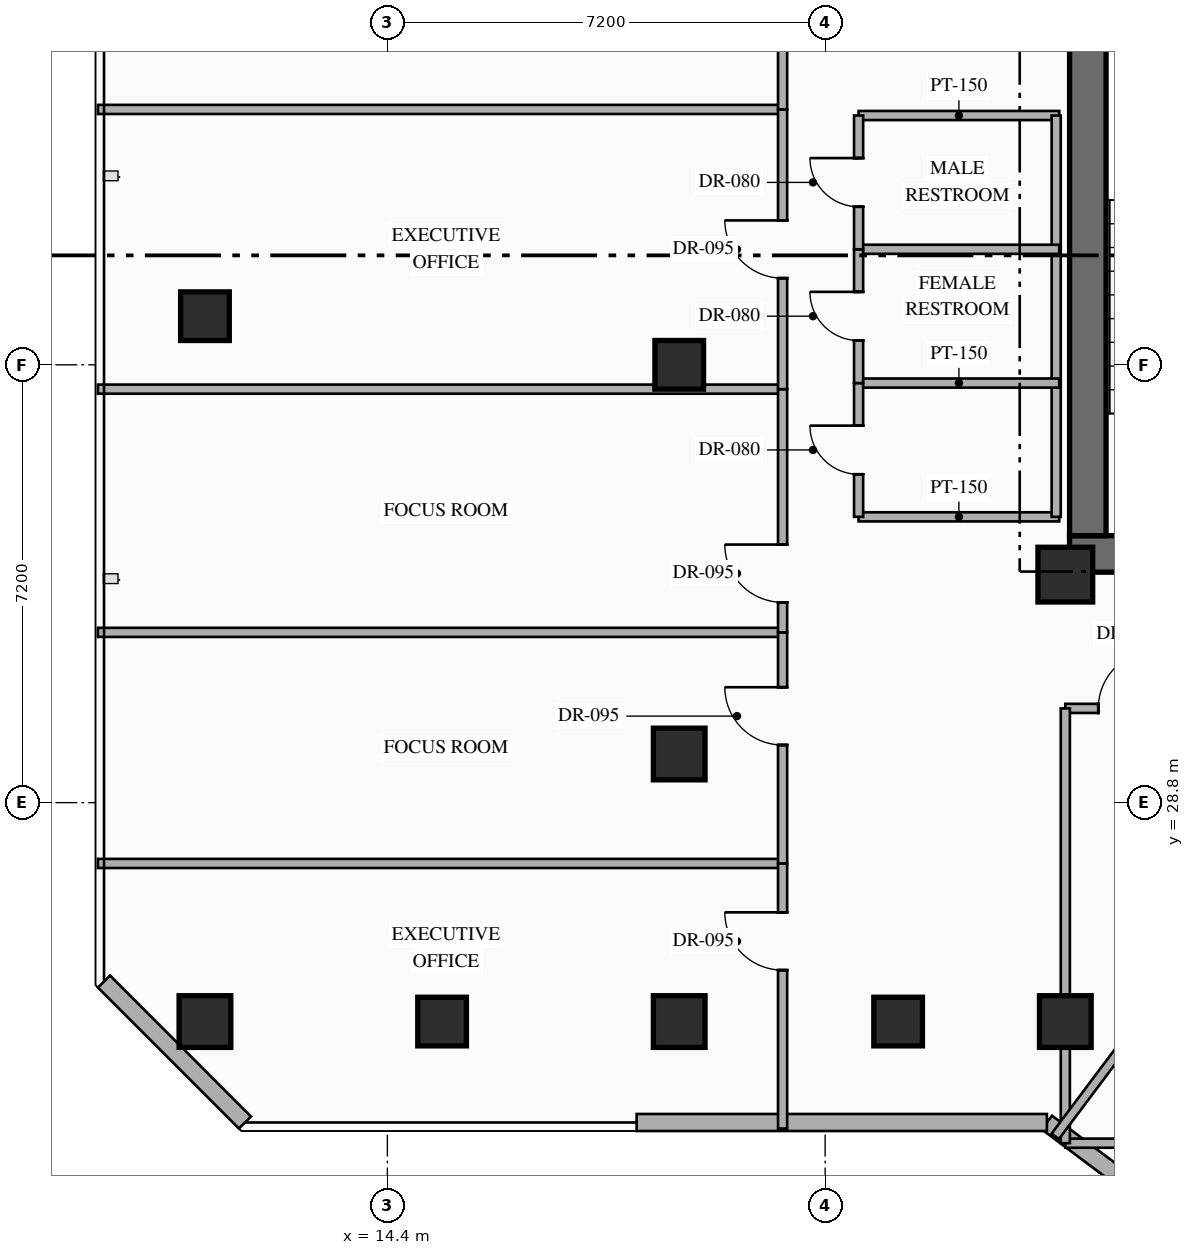
"""IFC4 building model, lengths in metres.
Left out: names, types, materials, properties, quantities, classifications, styles, units other than length and angle.
Written with IfcOpenShell. Run it as: python <this file> out.ifc"""

import sys

from ifc_helpers import new_model, si_unit, direction, frame, frame_2d, origin, origin_2d, place, context, subcontext, project, spatial, rectangle, hollow_rectangle, extrude, element, fill, save


model = new_model("IFC4")
c1 = context("Model", 3, precision=1e-05, world=origin(), true_north=direction((0.0, 1.0)))
c2 = subcontext(c1, "Body", "Model", "MODEL_VIEW")
j1 = project(units=[si_unit("LENGTHUNIT", "METRE"), si_unit("PLANEANGLEUNIT", "RADIAN")], contexts=[c1])
p1 = place(None, origin())
s1 = spatial("IfcSite", under=j1, at=p1, CompositionType="ELEMENT")
p2 = place(p1, origin())
s2 = spatial("IfcBuilding", under=s1, at=p2, CompositionType="ELEMENT")
p3 = place(p2, frame((0.0, 0.0, 149.25)))
s3 = spatial("IfcBuildingStorey", under=s2, at=p3, CompositionType="ELEMENT", Elevation=149.25)
p4 = place(p3, frame((25.62, 32.89, 0.0), z_axis=(0.0, 0.0, 1.0), x_axis=(1.0, 0.0, 0.0)))
e1 = element("IfcWall", 1, at=p4, inside=s3, PredefinedType="SHEAR", context=c2, shape_type="SweptSolid", body=[
    extrude(rectangle(XDim=7.78, YDim=0.6, at=frame_2d((3.89, 0.0))), origin(), (0.0, 0.0, 1.0), 3.6),
])
p5 = place(p4, frame((2.83, 0.0, 0.0)))
e2 = element("IfcOpeningElement", 2, at=p5, cuts=e1, PredefinedType="OPENING", context=c2, shape_type="SweptSolid", body=[
    extrude(rectangle(XDim=1.1, YDim=2.2, at=frame_2d((0.55, 1.1))), frame((0.0, 0.31, 0.0), z_axis=(0.0, -1.0, 0.0), x_axis=(1.0, 0.0, 0.0)), (0.0, 0.0, 1.0), 0.62),
])
p6 = place(p4, frame((5.58, 0.0, 0.0)))
e3 = element("IfcOpeningElement", 3, at=p6, cuts=e1, PredefinedType="OPENING", context=c2, shape_type="SweptSolid", body=[
    extrude(rectangle(XDim=1.1, YDim=2.15, at=frame_2d((0.55, 1.075))), frame((0.0, 0.31, 0.0), z_axis=(0.0, -1.0, 0.0), x_axis=(1.0, 0.0, 0.0)), (0.0, 0.0, 1.0), 0.62),
])
p7 = place(p3, frame((25.92, 33.19, 0.0), z_axis=(0.0, 0.0, 1.0), x_axis=(0.0, 1.0, 0.0)))
e4 = element("IfcWall", 4, at=p7, inside=s3, PredefinedType="SHEAR", context=c2, shape_type="SweptSolid", body=[
    extrude(rectangle(XDim=9.48, YDim=0.6, at=frame_2d((4.74, 0.0))), origin(), (0.0, 0.0, 1.0), 3.6),
])
p8 = place(p3, frame((25.55, 32.55, 0.0), z_axis=(0.0, 0.0, 1.0), x_axis=(1.0, 0.0, 0.0)))
e5 = element("IfcColumn", 5, at=p8, inside=s3, PredefinedType="COLUMN", context=c2, shape_type="SweptSolid", body=[
    extrude(rectangle(XDim=0.9, YDim=0.9, at=origin_2d()), origin(), (0.0, 0.0, 1.0), 3.6),
])
for number, where, z_axis, x_axis in (
    (6, (25.55, 25.2, 0.0), (0.0, 0.0, 1.0), (1.0, 0.0, 0.0)),
    (7, (11.4, 25.2, 0.0), (0.0, 0.0, 1.0), (1.0, 0.0, 0.0)),
    (8, (19.2, 25.2, 0.0), (0.0, 0.0, 1.0), (1.0, 0.0, 0.0)),
    (9, (19.2, 29.6, 0.0), (0.0, 0.0, 1.0), (1.0, 0.0, 0.0)),
):
    element("IfcColumn", number, at=place(p3, frame(where, z_axis=z_axis, x_axis=x_axis)), inside=s3, PredefinedType="COLUMN", context=c2, shape_type="SweptSolid", body=[
        extrude(hollow_rectangle(XDim=0.85, YDim=0.85, WallThickness=0.032, at=origin_2d()), origin(), (0.0, 0.0, 1.0), 3.6),
    ])
for number, where, z_axis, x_axis in (
    (10, (22.8, 25.2, 0.0), (0.0, 0.0, 1.0), (1.0, 0.0, 0.0)),
    (11, (11.4, 36.8, 0.0), (0.0, 0.0, 1.0), (1.0, 0.0, 0.0)),
    (12, (19.2, 36.0, 0.0), (0.0, 0.0, 1.0), (1.0, 0.0, 0.0)),
    (13, (15.3, 25.2, 0.0), (0.0, 0.0, 1.0), (1.0, 0.0, 0.0)),
):
    element("IfcColumn", number, at=place(p3, frame(where, z_axis=z_axis, x_axis=x_axis)), inside=s3, PredefinedType="COLUMN", context=c2, shape_type="SweptSolid", body=[
        extrude(hollow_rectangle(XDim=0.8, YDim=0.8, WallThickness=0.032, at=origin_2d()), origin(), (0.0, 0.0, 1.0), 3.6),
    ])
p9 = place(p3, frame((44.918, 8.787, 0.0), z_axis=(0.0, 0.0, 1.0), x_axis=(-0.800004765927, 0.599993645378, 0.0)))
e14 = element("IfcWall", 14, at=p9, inside=s3, PredefinedType="STANDARD", context=c2, shape_type="SweptSolid", body=[
    extrude(rectangle(XDim=24.588, YDim=0.28, at=frame_2d((12.294, 0.0))), origin(), (0.0, 0.0, 1.0), 3.35),
])
p10 = place(p3, frame((25.247, 23.54, 0.0), z_axis=(0.0, 0.0, 1.0), x_axis=(-1.0, 0.0, 0.0)))
e15 = element("IfcWall", 15, at=p10, inside=s3, PredefinedType="STANDARD", context=c2, shape_type="SweptSolid", body=[
    extrude(rectangle(XDim=6.747, YDim=0.28, at=frame_2d((3.374, 0.0))), origin(), (0.0, 0.0, 1.0), 3.35),
])
p11 = place(p3, frame((12.058, 23.54, 0.0), z_axis=(0.0, 0.0, 1.0), x_axis=(-0.707144017911, 0.707069542501, 0.0)))
e16 = element("IfcWall", 16, at=p11, inside=s3, PredefinedType="STANDARD", context=c2, shape_type="SweptSolid", body=[
    extrude(rectangle(XDim=3.278, YDim=0.28, at=frame_2d((1.639, 0.0))), origin(), (0.0, 0.0, 1.0), 3.35),
])
for number, where, z_axis, x_axis in (
    (17, (22.15, 33.5, 0.0), (0.0, 0.0, 1.0), (1.0, 0.0, 0.0)),
    (18, (22.15, 40.1, 0.0), (0.0, 0.0, 1.0), (1.0, 0.0, 0.0)),
):
    element("IfcWall", number, at=place(p3, frame(where, z_axis=z_axis, x_axis=x_axis)), inside=s3, PredefinedType="PARTITIONING", context=c2, shape_type="SweptSolid", body=[
        extrude(rectangle(XDim=3.3, YDim=0.15, at=frame_2d((1.65, 0.0))), origin(), (0.0, 0.0, 1.0), 3.35),
    ])
p12 = place(p3, frame((25.4, 33.5, 0.0), z_axis=(0.0, 0.0, 1.0), x_axis=(0.0, 1.0, 0.0)))
e19 = element("IfcWall", 19, at=p12, inside=s3, PredefinedType="PARTITIONING", context=c2, shape_type="SweptSolid", body=[
    extrude(rectangle(XDim=6.6, YDim=0.15, at=frame_2d((3.3, 0.0))), origin(), (0.0, 0.0, 1.0), 3.35),
])
for number, where, z_axis, x_axis in (
    (20, (22.15, 35.7, 0.0), (0.0, 0.0, 1.0), (1.0, 0.0, 0.0)),
    (21, (22.15, 37.9, 0.0), (0.0, 0.0, 1.0), (1.0, 0.0, 0.0)),
):
    element("IfcWall", number, at=place(p3, frame(where, z_axis=z_axis, x_axis=x_axis)), inside=s3, PredefinedType="PARTITIONING", context=c2, shape_type="SweptSolid", body=[
        extrude(rectangle(XDim=3.3, YDim=0.15, at=frame_2d((1.65, 0.0))), origin(), (0.0, 0.0, 1.0), 3.35),
    ])
p13 = place(p3, frame((22.15, 33.5, 0.0), z_axis=(0.0, 0.0, 1.0), x_axis=(0.0, 1.0, 0.0)))
e22 = element("IfcWall", 22, at=p13, inside=s3, PredefinedType="PARTITIONING", context=c2, shape_type="SweptSolid", body=[
    extrude(rectangle(XDim=2.2, YDim=0.15, at=frame_2d((1.1, 0.0))), origin(), (0.0, 0.0, 1.0), 3.35),
])
p14 = place(p13, frame((0.7, 0.0, 0.0)))
e23 = element("IfcOpeningElement", 23, at=p14, cuts=e22, PredefinedType="OPENING", context=c2, shape_type="SweptSolid", body=[
    extrude(rectangle(XDim=0.8, YDim=2.06, at=frame_2d((0.4, 1.03))), frame((0.0, 0.085, 0.0), z_axis=(0.0, -1.0, 0.0), x_axis=(1.0, 0.0, 0.0)), (0.0, 0.0, 1.0), 0.17),
])
p15 = place(p3, frame((22.15, 35.7, 0.0), z_axis=(0.0, 0.0, 1.0), x_axis=(0.0, 1.0, 0.0)))
e24 = element("IfcWall", 24, at=p15, inside=s3, PredefinedType="PARTITIONING", context=c2, shape_type="SweptSolid", body=[
    extrude(rectangle(XDim=2.2, YDim=0.15, at=frame_2d((1.1, 0.0))), origin(), (0.0, 0.0, 1.0), 3.35),
])
p16 = place(p15, frame((0.7, 0.0, 0.0)))
e25 = element("IfcOpeningElement", 25, at=p16, cuts=e24, PredefinedType="OPENING", context=c2, shape_type="SweptSolid", body=[
    extrude(rectangle(XDim=0.8, YDim=2.06, at=frame_2d((0.4, 1.03))), frame((0.0, 0.085, 0.0), z_axis=(0.0, -1.0, 0.0), x_axis=(1.0, 0.0, 0.0)), (0.0, 0.0, 1.0), 0.17),
])
p17 = place(p3, frame((22.15, 37.9, 0.0), z_axis=(0.0, 0.0, 1.0), x_axis=(0.0, 1.0, 0.0)))
e26 = element("IfcWall", 26, at=p17, inside=s3, PredefinedType="PARTITIONING", context=c2, shape_type="SweptSolid", body=[
    extrude(rectangle(XDim=2.2, YDim=0.15, at=frame_2d((1.1, 0.0))), origin(), (0.0, 0.0, 1.0), 3.35),
])
p18 = place(p17, frame((0.7, 0.0, 0.0)))
e27 = element("IfcOpeningElement", 27, at=p18, cuts=e26, PredefinedType="OPENING", context=c2, shape_type="SweptSolid", body=[
    extrude(rectangle(XDim=0.8, YDim=2.06, at=frame_2d((0.4, 1.03))), frame((0.0, 0.085, 0.0), z_axis=(0.0, -1.0, 0.0), x_axis=(1.0, 0.0, 0.0)), (0.0, 0.0, 1.0), 0.17),
])
p19 = place(p3, frame((25.55, 23.2, 0.0), z_axis=(0.0, 0.0, 1.0), x_axis=(1.0, 0.0, 0.0)))
e28 = element("IfcWall", 28, at=p19, inside=s3, PredefinedType="PARTITIONING", context=c2, shape_type="SweptSolid", body=[
    extrude(rectangle(XDim=4.95, YDim=0.15, at=frame_2d((2.475, 0.0))), origin(), (0.0, 0.0, 1.0), 3.35),
])
p20 = place(p3, frame((25.55, 30.35, 0.0), z_axis=(0.0, 0.0, 1.0), x_axis=(1.0, 0.0, 0.0)))
e29 = element("IfcWall", 29, at=p20, inside=s3, PredefinedType="PARTITIONING", context=c2, shape_type="SweptSolid", body=[
    extrude(rectangle(XDim=4.95, YDim=0.15, at=frame_2d((2.475, 0.0))), origin(), (0.0, 0.0, 1.0), 3.35),
])
p21 = place(p20, frame((0.542, 0.0, 0.0)))
e30 = element("IfcOpeningElement", 30, at=p21, cuts=e29, PredefinedType="OPENING", context=c2, shape_type="SweptSolid", body=[
    extrude(rectangle(XDim=0.95, YDim=2.15, at=frame_2d((0.475, 1.075))), frame((0.0, 0.085, 0.0), z_axis=(0.0, -1.0, 0.0), x_axis=(1.0, 0.0, 0.0)), (0.0, 0.0, 1.0), 0.17),
])
p22 = place(p3, frame((25.55, 23.2, 0.0), z_axis=(0.0, 0.0, 1.0), x_axis=(0.0, 1.0, 0.0)))
e31 = element("IfcWall", 31, at=p22, inside=s3, PredefinedType="PARTITIONING", context=c2, shape_type="SweptSolid", body=[
    extrude(rectangle(XDim=7.15, YDim=0.15, at=frame_2d((3.575, 0.0))), origin(), (0.0, 0.0, 1.0), 2.695),
])
p23 = place(p3, frame((9.64, 27.8, 0.0), z_axis=(0.0, 0.0, 1.0), x_axis=(1.0, 0.0, 0.0)))
e32 = element("IfcWall", 32, at=p23, inside=s3, PredefinedType="PARTITIONING", context=c2, shape_type="SweptSolid", body=[
    extrude(rectangle(XDim=11.26, YDim=0.15, at=frame_2d((5.63, 0.0))), origin(), (0.0, 0.0, 1.0), 3.35),
])
p24 = place(p3, frame((20.9, 23.44, 0.0), z_axis=(0.0, 0.0, 1.0), x_axis=(0.0, 1.0, 0.0)))
e33 = element("IfcWall", 33, at=p24, inside=s3, PredefinedType="PARTITIONING", context=c2, shape_type="SweptSolid", body=[
    extrude(rectangle(XDim=4.36, YDim=0.15, at=frame_2d((2.18, 0.0))), origin(), (0.0, 0.0, 1.0), 3.35),
])
p25 = place(p24, frame((2.606, 0.0, 0.0)))
e34 = element("IfcOpeningElement", 34, at=p25, cuts=e33, PredefinedType="OPENING", context=c2, shape_type="SweptSolid", body=[
    extrude(rectangle(XDim=0.95, YDim=2.15, at=frame_2d((0.475, 1.075))), frame((0.0, 0.085, 0.0), z_axis=(0.0, -1.0, 0.0), x_axis=(1.0, 0.0, 0.0)), (0.0, 0.0, 1.0), 0.17),
])
p26 = place(p3, frame((9.64, 31.6, 0.0), z_axis=(0.0, 0.0, 1.0), x_axis=(1.0, 0.0, 0.0)))
e35 = element("IfcWall", 35, at=p26, inside=s3, PredefinedType="PARTITIONING", context=c2, shape_type="SweptSolid", body=[
    extrude(rectangle(XDim=11.26, YDim=0.15, at=frame_2d((5.63, 0.0))), origin(), (0.0, 0.0, 1.0), 3.35),
])
p27 = place(p3, frame((20.9, 27.8, 0.0), z_axis=(0.0, 0.0, 1.0), x_axis=(0.0, 1.0, 0.0)))
e36 = element("IfcWall", 36, at=p27, inside=s3, PredefinedType="PARTITIONING", context=c2, shape_type="SweptSolid", body=[
    extrude(rectangle(XDim=3.8, YDim=0.15, at=frame_2d((1.9, 0.0))), origin(), (0.0, 0.0, 1.0), 3.35),
])
p28 = place(p27, frame((1.948, 0.0, 0.0)))
e37 = element("IfcOpeningElement", 37, at=p28, cuts=e36, PredefinedType="OPENING", context=c2, shape_type="SweptSolid", body=[
    extrude(rectangle(XDim=0.95, YDim=2.15, at=frame_2d((0.475, 1.075))), frame((0.0, 0.085, 0.0), z_axis=(0.0, -1.0, 0.0), x_axis=(1.0, 0.0, 0.0)), (0.0, 0.0, 1.0), 0.17),
])
p29 = place(p3, frame((9.64, 35.6, 0.0), z_axis=(0.0, 0.0, 1.0), x_axis=(1.0, 0.0, 0.0)))
e38 = element("IfcWall", 38, at=p29, inside=s3, PredefinedType="PARTITIONING", context=c2, shape_type="SweptSolid", body=[
    extrude(rectangle(XDim=11.26, YDim=0.15, at=frame_2d((5.63, 0.0))), origin(), (0.0, 0.0, 1.0), 3.35),
])
p30 = place(p3, frame((20.9, 31.6, 0.0), z_axis=(0.0, 0.0, 1.0), x_axis=(0.0, 1.0, 0.0)))
e39 = element("IfcWall", 39, at=p30, inside=s3, PredefinedType="PARTITIONING", context=c2, shape_type="SweptSolid", body=[
    extrude(rectangle(XDim=4.0, YDim=0.15, at=frame_2d((2.0, 0.0))), origin(), (0.0, 0.0, 1.0), 3.35),
])
p31 = place(p30, frame((0.494, 0.0, 0.0)))
e40 = element("IfcOpeningElement", 40, at=p31, cuts=e39, PredefinedType="OPENING", context=c2, shape_type="SweptSolid", body=[
    extrude(rectangle(XDim=0.95, YDim=2.15, at=frame_2d((0.475, 1.075))), frame((0.0, 0.085, 0.0), z_axis=(0.0, -1.0, 0.0), x_axis=(1.0, 0.0, 0.0)), (0.0, 0.0, 1.0), 0.17),
])
p32 = place(p3, frame((9.64, 40.2, 0.0), z_axis=(0.0, 0.0, 1.0), x_axis=(1.0, 0.0, 0.0)))
e41 = element("IfcWall", 41, at=p32, inside=s3, PredefinedType="PARTITIONING", context=c2, shape_type="SweptSolid", body=[
    extrude(rectangle(XDim=11.26, YDim=0.15, at=frame_2d((5.63, 0.0))), origin(), (0.0, 0.0, 1.0), 3.35),
])
p33 = place(p3, frame((20.9, 35.6, 0.0), z_axis=(0.0, 0.0, 1.0), x_axis=(0.0, 1.0, 0.0)))
e42 = element("IfcWall", 42, at=p33, inside=s3, PredefinedType="PARTITIONING", context=c2, shape_type="SweptSolid", body=[
    extrude(rectangle(XDim=4.6, YDim=0.15, at=frame_2d((2.3, 0.0))), origin(), (0.0, 0.0, 1.0), 3.35),
])
p34 = place(p33, frame((1.825, 0.0, 0.0)))
e43 = element("IfcOpeningElement", 43, at=p34, cuts=e42, PredefinedType="OPENING", context=c2, shape_type="SweptSolid", body=[
    extrude(rectangle(XDim=0.95, YDim=2.15, at=frame_2d((0.475, 1.075))), frame((0.0, 0.085, 0.0), z_axis=(0.0, -1.0, 0.0), x_axis=(1.0, 0.0, 0.0)), (0.0, 0.0, 1.0), 0.17),
])
p35 = place(p3, frame((20.9, 40.2, 0.0), z_axis=(0.0, 0.0, 1.0), x_axis=(0.0, 1.0, 0.0)))
e44 = element("IfcWall", 44, at=p35, inside=s3, PredefinedType="PARTITIONING", context=c2, shape_type="SweptSolid", body=[
    extrude(rectangle(XDim=5.2, YDim=0.15, at=frame_2d((2.6, 0.0))), origin(), (0.0, 0.0, 1.0), 3.35),
])
p36 = place(p35, frame((2.474, 0.0, 0.0)))
e45 = element("IfcOpeningElement", 45, at=p36, cuts=e44, PredefinedType="OPENING", context=c2, shape_type="SweptSolid", body=[
    extrude(rectangle(XDim=0.95, YDim=2.15, at=frame_2d((0.475, 1.075))), frame((0.0, 0.085, 0.0), z_axis=(0.0, -1.0, 0.0), x_axis=(1.0, 0.0, 0.0)), (0.0, 0.0, 1.0), 0.17),
])
p37 = place(p3, frame((25.384, 23.312, 0.0), z_axis=(0.0, 0.0, 1.0), x_axis=(0.599990721155, 0.80000695905, 0.0)))
e46 = element("IfcWall", 46, at=p37, inside=s3, PredefinedType="PARTITIONING", context=c2, shape_type="SweptSolid", body=[
    extrude(rectangle(XDim=4.21, YDim=0.15, at=frame_2d((2.105, 0.0))), origin(), (0.0, 0.0, 1.0), 3.35),
])
p38 = place(p14, origin())
e47 = element("IfcDoor", 47, at=p38, inside=s3, OperationType="SINGLE_SWING_RIGHT", PredefinedType="DOOR", context=c2, shape_type="SweptSolid", body=[
    extrude(rectangle(XDim=0.8, YDim=2.06, at=frame_2d((0.4, 1.03))), frame((0.0, 0.025, 0.0), z_axis=(0.0, -1.0, 0.0), x_axis=(1.0, 0.0, 0.0)), (0.0, 0.0, 1.0), 0.05),
])
fill(e23, e47)
p39 = place(p16, origin())
e48 = element("IfcDoor", 48, at=p39, inside=s3, OperationType="SINGLE_SWING_RIGHT", PredefinedType="DOOR", context=c2, shape_type="SweptSolid", body=[
    extrude(rectangle(XDim=0.8, YDim=2.06, at=frame_2d((0.4, 1.03))), frame((0.0, 0.025, 0.0), z_axis=(0.0, -1.0, 0.0), x_axis=(1.0, 0.0, 0.0)), (0.0, 0.0, 1.0), 0.05),
])
fill(e25, e48)
p40 = place(p18, origin())
e49 = element("IfcDoor", 49, at=p40, inside=s3, OperationType="SINGLE_SWING_RIGHT", PredefinedType="DOOR", context=c2, shape_type="SweptSolid", body=[
    extrude(rectangle(XDim=0.8, YDim=2.06, at=frame_2d((0.4, 1.03))), frame((0.0, 0.025, 0.0), z_axis=(0.0, -1.0, 0.0), x_axis=(1.0, 0.0, 0.0)), (0.0, 0.0, 1.0), 0.05),
])
fill(e27, e49)
p41 = place(p21, origin())
e50 = element("IfcDoor", 50, at=p41, inside=s3, OperationType="SINGLE_SWING_RIGHT", PredefinedType="DOOR", context=c2, shape_type="SweptSolid", body=[
    extrude(rectangle(XDim=0.95, YDim=2.15, at=frame_2d((0.475, 1.075))), frame((0.0, 0.025, 0.0), z_axis=(0.0, -1.0, 0.0), x_axis=(1.0, 0.0, 0.0)), (0.0, 0.0, 1.0), 0.05),
])
fill(e30, e50)
p42 = place(p25, origin())
e51 = element("IfcDoor", 51, at=p42, inside=s3, OperationType="SINGLE_SWING_RIGHT", PredefinedType="DOOR", context=c2, shape_type="SweptSolid", body=[
    extrude(rectangle(XDim=0.95, YDim=2.15, at=frame_2d((0.475, 1.075))), frame((0.0, 0.025, 0.0), z_axis=(0.0, -1.0, 0.0), x_axis=(1.0, 0.0, 0.0)), (0.0, 0.0, 1.0), 0.05),
])
fill(e34, e51)
p43 = place(p28, origin())
e52 = element("IfcDoor", 52, at=p43, inside=s3, OperationType="SINGLE_SWING_RIGHT", PredefinedType="DOOR", context=c2, shape_type="SweptSolid", body=[
    extrude(rectangle(XDim=0.95, YDim=2.15, at=frame_2d((0.475, 1.075))), frame((0.0, 0.025, 0.0), z_axis=(0.0, -1.0, 0.0), x_axis=(1.0, 0.0, 0.0)), (0.0, 0.0, 1.0), 0.05),
])
fill(e37, e52)
p44 = place(p31, origin())
e53 = element("IfcDoor", 53, at=p44, inside=s3, OperationType="SINGLE_SWING_RIGHT", PredefinedType="DOOR", context=c2, shape_type="SweptSolid", body=[
    extrude(rectangle(XDim=0.95, YDim=2.15, at=frame_2d((0.475, 1.075))), frame((0.0, 0.025, 0.0), z_axis=(0.0, -1.0, 0.0), x_axis=(1.0, 0.0, 0.0)), (0.0, 0.0, 1.0), 0.05),
])
fill(e40, e53)
p45 = place(p34, origin())
e54 = element("IfcDoor", 54, at=p45, inside=s3, OperationType="SINGLE_SWING_RIGHT", PredefinedType="DOOR", context=c2, shape_type="SweptSolid", body=[
    extrude(rectangle(XDim=0.95, YDim=2.15, at=frame_2d((0.475, 1.075))), frame((0.0, 0.025, 0.0), z_axis=(0.0, -1.0, 0.0), x_axis=(1.0, 0.0, 0.0)), (0.0, 0.0, 1.0), 0.05),
])
fill(e43, e54)
save(model, sys.argv[1])
